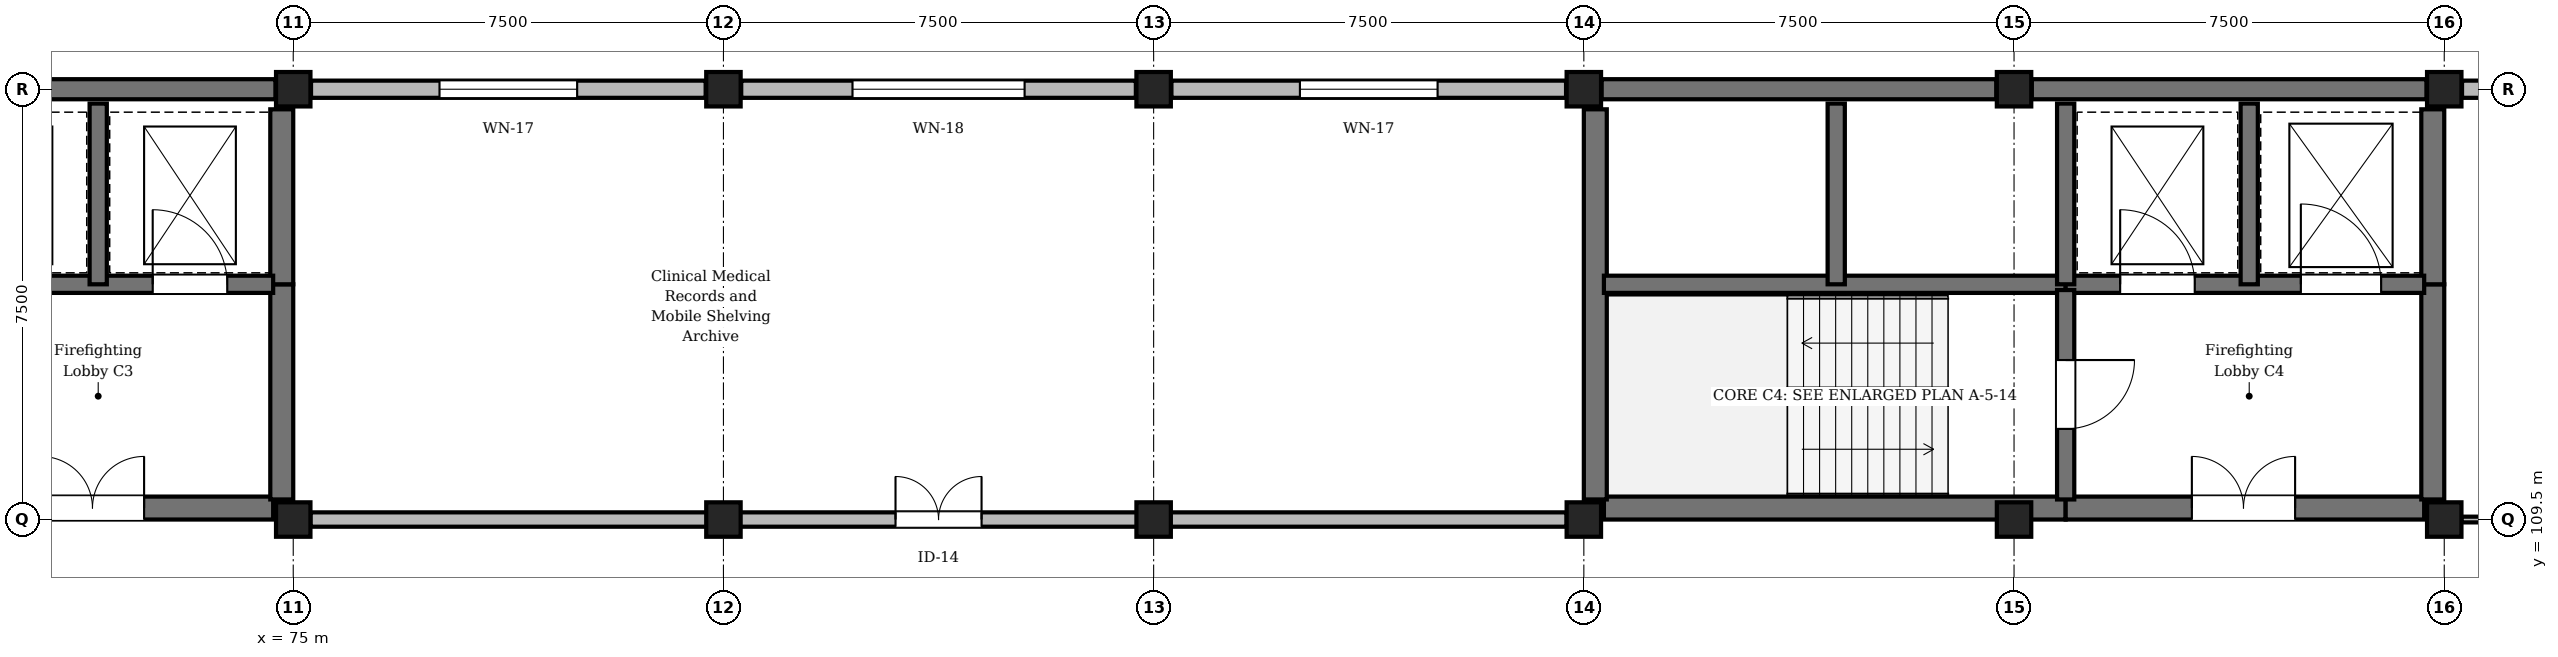
"""IFC4 building model, lengths in metres.
Left out: names, types, materials, properties, quantities, classifications, styles, units other than length and angle.
Written with IfcOpenShell. Run it as: python <this file> out.ifc"""

import sys

from ifc_helpers import new_model, si_unit, direction, frame, frame_2d, origin, origin_2d, place, context, subcontext, project, spatial, rectangle, circle, extrude, element, fill, save


model = new_model("IFC4")
c1 = context("Model", 3, precision=1e-05, world=origin(), true_north=direction((0.0, 1.0)))
c2 = subcontext(c1, "Body", "Model", "MODEL_VIEW")
j1 = project(units=[si_unit("LENGTHUNIT", "METRE"), si_unit("PLANEANGLEUNIT", "RADIAN")], contexts=[c1])
p1 = place(None, origin())
s1 = spatial("IfcSite", under=j1, at=p1, CompositionType="ELEMENT")
p2 = place(p1, origin())
s2 = spatial("IfcBuilding", under=s1, at=p2, CompositionType="ELEMENT")
p3 = place(p2, frame((0.0, 0.0, 14.1)))
s3 = spatial("IfcBuildingStorey", under=s2, at=p3, CompositionType="ELEMENT", Elevation=14.1)
p4 = place(p3, frame((75.0, 109.5, 0.0), z_axis=(0.0, 0.0, 1.0), x_axis=(1.0, 0.0, 0.0)))
e1 = element("IfcColumn", 1, at=p4, inside=s3, PredefinedType="COLUMN", context=c2, shape_type="SweptSolid", body=[
    extrude(circle(Radius=0.3, at=origin_2d()), origin(), (0.0, 0.0, 1.0), 3.75),
])
for number, where, z_axis, x_axis in (
    (2, (75.0, 117.0, 0.0), (0.0, 0.0, 1.0), (1.0, 0.0, 0.0)),
    (3, (82.5, 109.5, 0.0), (0.0, 0.0, 1.0), (1.0, 0.0, 0.0)),
    (4, (82.5, 117.0, 0.0), (0.0, 0.0, 1.0), (1.0, 0.0, 0.0)),
    (5, (90.0, 109.5, 0.0), (0.0, 0.0, 1.0), (1.0, 0.0, 0.0)),
):
    element("IfcColumn", number, at=place(p3, frame(where, z_axis=z_axis, x_axis=x_axis)), inside=s3, PredefinedType="COLUMN", context=c2, shape_type="SweptSolid", body=[
        extrude(rectangle(XDim=0.6, YDim=0.6, at=origin_2d()), origin(), (0.0, 0.0, 1.0), 3.75),
    ])
for number, where, z_axis, x_axis in (
    (6, (90.0, 117.0, 0.0), (0.0, 0.0, 1.0), (1.0, 0.0, 0.0)),
    (7, (97.5, 109.5, 0.0), (0.0, 0.0, 1.0), (1.0, 0.0, 0.0)),
):
    element("IfcColumn", number, at=place(p3, frame(where, z_axis=z_axis, x_axis=x_axis)), inside=s3, PredefinedType="COLUMN", context=c2, shape_type="SweptSolid", body=[
        extrude(circle(Radius=0.3, at=origin_2d()), origin(), (0.0, 0.0, 1.0), 3.75),
    ])
for number, where, z_axis, x_axis in (
    (8, (97.5, 117.0, 0.0), (0.0, 0.0, 1.0), (1.0, 0.0, 0.0)),
    (9, (105.0, 109.5, 0.0), (0.0, 0.0, 1.0), (1.0, 0.0, 0.0)),
    (10, (105.0, 117.0, 0.0), (0.0, 0.0, 1.0), (1.0, 0.0, 0.0)),
    (11, (112.5, 109.5, 0.0), (0.0, 0.0, 1.0), (1.0, 0.0, 0.0)),
):
    element("IfcColumn", number, at=place(p3, frame(where, z_axis=z_axis, x_axis=x_axis)), inside=s3, PredefinedType="COLUMN", context=c2, shape_type="SweptSolid", body=[
        extrude(rectangle(XDim=0.6, YDim=0.6, at=origin_2d()), origin(), (0.0, 0.0, 1.0), 3.75),
    ])
p5 = place(p3, frame((112.5, 117.0, 0.0), z_axis=(0.0, 0.0, 1.0), x_axis=(1.0, 0.0, 0.0)))
e12 = element("IfcColumn", 12, at=p5, inside=s3, PredefinedType="COLUMN", context=c2, shape_type="SweptSolid", body=[
    extrude(circle(Radius=0.3, at=origin_2d()), origin(), (0.0, 0.0, 1.0), 3.75),
])
p6 = place(p3, frame((67.81, 117.0, 0.0), z_axis=(0.0, 0.0, 1.0), x_axis=(1.0, 0.0, 0.0)))
e13 = element("IfcWall", 13, at=p6, inside=s3, PredefinedType="SHEAR", context=c2, shape_type="SweptSolid", body=[
    extrude(rectangle(XDim=6.88, YDim=0.35, at=frame_2d((3.44, 0.0))), origin(), (0.0, 0.0, 1.0), 3.47),
])
p7 = place(p3, frame((75.31, 117.0, 0.0), z_axis=(0.0, 0.0, 1.0), x_axis=(1.0, 0.0, 0.0)))
e14 = element("IfcWall", 14, at=p7, inside=s3, PredefinedType="STANDARD", context=c2, shape_type="SweptSolid", body=[
    extrude(rectangle(XDim=6.88, YDim=0.3, at=frame_2d((3.44, 0.0))), origin(), (0.0, 0.0, 1.0), 2.87),
])
p8 = place(p7, frame((2.24, 0.0, 1.1)))
e15 = element("IfcOpeningElement", 15, at=p8, cuts=e14, PredefinedType="OPENING", context=c2, shape_type="SweptSolid", body=[
    extrude(rectangle(XDim=2.4, YDim=1.2, at=frame_2d((1.2, 0.6))), frame((0.0, 0.16, 0.0), z_axis=(0.0, -1.0, 0.0), x_axis=(1.0, 0.0, 0.0)), (0.0, 0.0, 1.0), 0.32),
])
p9 = place(p3, frame((82.81, 117.0, 0.0), z_axis=(0.0, 0.0, 1.0), x_axis=(1.0, 0.0, 0.0)))
e16 = element("IfcWall", 16, at=p9, inside=s3, PredefinedType="STANDARD", context=c2, shape_type="SweptSolid", body=[
    extrude(rectangle(XDim=6.88, YDim=0.3, at=frame_2d((3.44, 0.0))), origin(), (0.0, 0.0, 1.0), 2.87),
])
p10 = place(p9, frame((1.94, 0.0, 1.1)))
e17 = element("IfcOpeningElement", 17, at=p10, cuts=e16, PredefinedType="OPENING", context=c2, shape_type="SweptSolid", body=[
    extrude(rectangle(XDim=3.0, YDim=1.2, at=frame_2d((1.5, 0.6))), frame((0.0, 0.16, 0.0), z_axis=(0.0, -1.0, 0.0), x_axis=(1.0, 0.0, 0.0)), (0.0, 0.0, 1.0), 0.32),
])
p11 = place(p3, frame((90.31, 117.0, 0.0), z_axis=(0.0, 0.0, 1.0), x_axis=(1.0, 0.0, 0.0)))
e18 = element("IfcWall", 18, at=p11, inside=s3, PredefinedType="STANDARD", context=c2, shape_type="SweptSolid", body=[
    extrude(rectangle(XDim=6.88, YDim=0.3, at=frame_2d((3.44, 0.0))), origin(), (0.0, 0.0, 1.0), 2.87),
])
p12 = place(p11, frame((2.24, 0.0, 1.1)))
e19 = element("IfcOpeningElement", 19, at=p12, cuts=e18, PredefinedType="OPENING", context=c2, shape_type="SweptSolid", body=[
    extrude(rectangle(XDim=2.4, YDim=1.2, at=frame_2d((1.2, 0.6))), frame((0.0, 0.16, 0.0), z_axis=(0.0, -1.0, 0.0), x_axis=(1.0, 0.0, 0.0)), (0.0, 0.0, 1.0), 0.32),
])
for number, where, z_axis, x_axis in (
    (20, (97.81, 117.0, 0.0), (0.0, 0.0, 1.0), (1.0, 0.0, 0.0)),
    (21, (105.31, 117.0, 0.0), (0.0, 0.0, 1.0), (1.0, 0.0, 0.0)),
):
    element("IfcWall", number, at=place(p3, frame(where, z_axis=z_axis, x_axis=x_axis)), inside=s3, PredefinedType="SHEAR", context=c2, shape_type="SweptSolid", body=[
        extrude(rectangle(XDim=6.88, YDim=0.35, at=frame_2d((3.44, 0.0))), origin(), (0.0, 0.0, 1.0), 3.47),
    ])
p13 = place(p3, frame((112.81, 117.0, 0.0), z_axis=(0.0, 0.0, 1.0), x_axis=(1.0, 0.0, 0.0)))
e22 = element("IfcWall", 22, at=p13, inside=s3, PredefinedType="STANDARD", context=c2, shape_type="SweptSolid", body=[
    extrude(rectangle(XDim=6.93, YDim=0.3, at=frame_2d((3.465, 0.0))), origin(), (0.0, 0.0, 1.0), 2.87),
])
p14 = place(p13, frame((1.965, 0.0, 1.1)))
e23 = element("IfcOpeningElement", 23, at=p14, cuts=e22, PredefinedType="OPENING", context=c2, shape_type="SweptSolid", body=[
    extrude(rectangle(XDim=3.0, YDim=1.2, at=frame_2d((1.5, 0.6))), frame((0.0, 0.16, 0.0), z_axis=(0.0, -1.0, 0.0), x_axis=(1.0, 0.0, 0.0)), (0.0, 0.0, 1.0), 0.32),
])
p15 = place(p3, frame((68.4, 109.7, 0.0), z_axis=(0.0, 0.0, 1.0), x_axis=(1.0, 0.0, 0.0)))
e24 = element("IfcWall", 24, at=p15, inside=s3, PredefinedType="SHEAR", context=c2, shape_type="SweptSolid", body=[
    extrude(rectangle(XDim=6.25, YDim=0.4, at=frame_2d((3.125, 0.0))), origin(), (0.0, 0.0, 1.0), 3.47),
])
p16 = place(p15, frame((2.2, 0.0, 0.0)))
e25 = element("IfcOpeningElement", 25, at=p16, cuts=e24, PredefinedType="OPENING", context=c2, shape_type="SweptSolid", body=[
    extrude(rectangle(XDim=1.8, YDim=2.25, at=frame_2d((0.9, 1.125))), frame((0.0, 0.21, 0.0), z_axis=(0.0, -1.0, 0.0), x_axis=(1.0, 0.0, 0.0)), (0.0, 0.0, 1.0), 0.42),
])
p17 = place(p3, frame((74.8, 109.85, 0.0), z_axis=(0.0, 0.0, 1.0), x_axis=(0.0, 1.0, 0.0)))
e26 = element("IfcWall", 26, at=p17, inside=s3, PredefinedType="SHEAR", context=c2, shape_type="SweptSolid", body=[
    extrude(rectangle(XDim=3.75, YDim=0.4, at=frame_2d((1.875, 0.0))), origin(), (0.0, 0.0, 1.0), 3.47),
])
p18 = place(p3, frame((74.8, 113.6, 0.0), z_axis=(0.0, 0.0, 1.0), x_axis=(0.0, 1.0, 0.0)))
e27 = element("IfcWall", 27, at=p18, inside=s3, PredefinedType="SHEAR", context=c2, shape_type="SweptSolid", body=[
    extrude(rectangle(XDim=3.05, YDim=0.4, at=frame_2d((1.525, 0.0))), origin(), (0.0, 0.0, 1.0), 3.47),
])
p19 = place(p3, frame((68.4, 113.6, 0.0), z_axis=(0.0, 0.0, 1.0), x_axis=(1.0, 0.0, 0.0)))
e28 = element("IfcWall", 28, at=p19, inside=s3, PredefinedType="SHEAR", context=c2, shape_type="SweptSolid", body=[
    extrude(rectangle(XDim=6.25, YDim=0.3, at=frame_2d((3.125, 0.0))), origin(), (0.0, 0.0, 1.0), 3.47),
])
p20 = place(p19, frame((0.95, 0.0, 0.0)))
e29 = element("IfcOpeningElement", 29, at=p20, cuts=e28, PredefinedType="OPENING", context=c2, shape_type="SweptSolid", body=[
    extrude(rectangle(XDim=1.3, YDim=2.2, at=frame_2d((0.65, 1.1))), frame((0.0, 0.16, 0.0), z_axis=(0.0, -1.0, 0.0), x_axis=(1.0, 0.0, 0.0)), (0.0, 0.0, 1.0), 0.32),
])
p21 = place(p19, frame((4.15, 0.0, 0.0)))
e30 = element("IfcOpeningElement", 30, at=p21, cuts=e28, PredefinedType="OPENING", context=c2, shape_type="SweptSolid", body=[
    extrude(rectangle(XDim=1.3, YDim=2.2, at=frame_2d((0.65, 1.1))), frame((0.0, 0.16, 0.0), z_axis=(0.0, -1.0, 0.0), x_axis=(1.0, 0.0, 0.0)), (0.0, 0.0, 1.0), 0.32),
])
p22 = place(p3, frame((71.6, 113.6, 0.0), z_axis=(0.0, 0.0, 1.0), x_axis=(0.0, 1.0, 0.0)))
e31 = element("IfcWall", 31, at=p22, inside=s3, PredefinedType="SHEAR", context=c2, shape_type="SweptSolid", body=[
    extrude(rectangle(XDim=3.15, YDim=0.3, at=frame_2d((1.575, 0.0))), origin(), (0.0, 0.0, 1.0), 3.47),
])
p23 = place(p3, frame((97.85, 109.7, 0.0), z_axis=(0.0, 0.0, 1.0), x_axis=(1.0, 0.0, 0.0)))
e32 = element("IfcWall", 32, at=p23, inside=s3, PredefinedType="SHEAR", context=c2, shape_type="SweptSolid", body=[
    extrude(rectangle(XDim=8.05, YDim=0.4, at=frame_2d((4.025, 0.0))), origin(), (0.0, 0.0, 1.0), 3.47),
])
p24 = place(p3, frame((105.9, 109.7, 0.0), z_axis=(0.0, 0.0, 1.0), x_axis=(1.0, 0.0, 0.0)))
e33 = element("IfcWall", 33, at=p24, inside=s3, PredefinedType="SHEAR", context=c2, shape_type="SweptSolid", body=[
    extrude(rectangle(XDim=6.25, YDim=0.4, at=frame_2d((3.125, 0.0))), origin(), (0.0, 0.0, 1.0), 3.47),
])
p25 = place(p24, frame((2.2, 0.0, 0.0)))
e34 = element("IfcOpeningElement", 34, at=p25, cuts=e33, PredefinedType="OPENING", context=c2, shape_type="SweptSolid", body=[
    extrude(rectangle(XDim=1.8, YDim=2.25, at=frame_2d((0.9, 1.125))), frame((0.0, 0.21, 0.0), z_axis=(0.0, -1.0, 0.0), x_axis=(1.0, 0.0, 0.0)), (0.0, 0.0, 1.0), 0.42),
])
p26 = place(p3, frame((97.7, 109.85, 0.0), z_axis=(0.0, 0.0, 1.0), x_axis=(0.0, 1.0, 0.0)))
e35 = element("IfcWall", 35, at=p26, inside=s3, PredefinedType="SHEAR", context=c2, shape_type="SweptSolid", body=[
    extrude(rectangle(XDim=6.8, YDim=0.4, at=frame_2d((3.4, 0.0))), origin(), (0.0, 0.0, 1.0), 3.47),
])
p27 = place(p3, frame((112.3, 109.85, 0.0), z_axis=(0.0, 0.0, 1.0), x_axis=(0.0, 1.0, 0.0)))
e36 = element("IfcWall", 36, at=p27, inside=s3, PredefinedType="SHEAR", context=c2, shape_type="SweptSolid", body=[
    extrude(rectangle(XDim=3.75, YDim=0.4, at=frame_2d((1.875, 0.0))), origin(), (0.0, 0.0, 1.0), 3.47),
])
p28 = place(p3, frame((112.3, 113.6, 0.0), z_axis=(0.0, 0.0, 1.0), x_axis=(0.0, 1.0, 0.0)))
e37 = element("IfcWall", 37, at=p28, inside=s3, PredefinedType="SHEAR", context=c2, shape_type="SweptSolid", body=[
    extrude(rectangle(XDim=3.05, YDim=0.4, at=frame_2d((1.525, 0.0))), origin(), (0.0, 0.0, 1.0), 3.47),
])
p29 = place(p3, frame((97.85, 113.6, 0.0), z_axis=(0.0, 0.0, 1.0), x_axis=(1.0, 0.0, 0.0)))
e38 = element("IfcWall", 38, at=p29, inside=s3, PredefinedType="SHEAR", context=c2, shape_type="SweptSolid", body=[
    extrude(rectangle(XDim=8.05, YDim=0.3, at=frame_2d((4.025, 0.0))), origin(), (0.0, 0.0, 1.0), 3.47),
])
p30 = place(p3, frame((105.9, 113.6, 0.0), z_axis=(0.0, 0.0, 1.0), x_axis=(1.0, 0.0, 0.0)))
e39 = element("IfcWall", 39, at=p30, inside=s3, PredefinedType="SHEAR", context=c2, shape_type="SweptSolid", body=[
    extrude(rectangle(XDim=6.25, YDim=0.3, at=frame_2d((3.125, 0.0))), origin(), (0.0, 0.0, 1.0), 3.47),
])
p31 = place(p30, frame((0.95, 0.0, 0.0)))
e40 = element("IfcOpeningElement", 40, at=p31, cuts=e39, PredefinedType="OPENING", context=c2, shape_type="SweptSolid", body=[
    extrude(rectangle(XDim=1.3, YDim=2.2, at=frame_2d((0.65, 1.1))), frame((0.0, 0.16, 0.0), z_axis=(0.0, -1.0, 0.0), x_axis=(1.0, 0.0, 0.0)), (0.0, 0.0, 1.0), 0.32),
])
p32 = place(p30, frame((4.1, 0.0, 0.0)))
e41 = element("IfcOpeningElement", 41, at=p32, cuts=e39, PredefinedType="OPENING", context=c2, shape_type="SweptSolid", body=[
    extrude(rectangle(XDim=1.4, YDim=2.25, at=frame_2d((0.7, 1.125))), frame((0.0, 0.16, 0.0), z_axis=(0.0, -1.0, 0.0), x_axis=(1.0, 0.0, 0.0)), (0.0, 0.0, 1.0), 0.32),
])
p33 = place(p3, frame((105.9, 113.5, 0.0), z_axis=(0.0, 0.0, 1.0), x_axis=(0.0, -1.0, 0.0)))
e42 = element("IfcWall", 42, at=p33, inside=s3, PredefinedType="SHEAR", context=c2, shape_type="SweptSolid", body=[
    extrude(rectangle(XDim=3.65, YDim=0.3, at=frame_2d((1.825, 0.0))), origin(), (0.0, 0.0, 1.0), 3.47),
])
p34 = place(p33, frame((1.22, 0.0, 0.0)))
e43 = element("IfcOpeningElement", 43, at=p34, cuts=e42, PredefinedType="OPENING", context=c2, shape_type="SweptSolid", body=[
    extrude(rectangle(XDim=1.2, YDim=2.25, at=frame_2d((0.6, 1.125))), frame((0.0, 0.16, 0.0), z_axis=(0.0, -1.0, 0.0), x_axis=(1.0, 0.0, 0.0)), (0.0, 0.0, 1.0), 0.32),
])
for number, where, z_axis, x_axis in (
    (44, (101.9, 113.6, 0.0), (0.0, 0.0, 1.0), (0.0, 1.0, 0.0)),
    (45, (105.9, 113.6, 0.0), (0.0, 0.0, 1.0), (0.0, 1.0, 0.0)),
    (46, (109.1, 113.6, 0.0), (0.0, 0.0, 1.0), (0.0, 1.0, 0.0)),
):
    element("IfcWall", number, at=place(p3, frame(where, z_axis=z_axis, x_axis=x_axis)), inside=s3, PredefinedType="SHEAR", context=c2, shape_type="SweptSolid", body=[
        extrude(rectangle(XDim=3.15, YDim=0.3, at=frame_2d((1.575, 0.0))), origin(), (0.0, 0.0, 1.0), 3.47),
    ])
p35 = place(p3, frame((75.3, 109.5, 0.0), z_axis=(0.0, 0.0, 1.0), x_axis=(1.0, 0.0, 0.0)))
e47 = element("IfcWall", 47, at=p35, inside=s3, PredefinedType="STANDARD", context=c2, shape_type="SweptSolid", body=[
    extrude(rectangle(XDim=21.9, YDim=0.25, at=frame_2d((10.95, 0.0))), origin(), (0.0, 0.0, 1.0), 2.855),
])
p36 = place(p35, frame((10.2, 0.0, 0.0)))
e48 = element("IfcOpeningElement", 48, at=p36, cuts=e47, PredefinedType="OPENING", context=c2, shape_type="SweptSolid", body=[
    extrude(rectangle(XDim=1.5, YDim=2.3, at=frame_2d((0.75, 1.15))), frame((0.0, 0.135, 0.0), z_axis=(0.0, -1.0, 0.0), x_axis=(1.0, 0.0, 0.0)), (0.0, 0.0, 1.0), 0.27),
])
p37 = place(p3, frame((112.8, 109.5, 0.0), z_axis=(0.0, 0.0, 1.0), x_axis=(1.0, 0.0, 0.0)))
e49 = element("IfcWall", 49, at=p37, inside=s3, PredefinedType="PARTITIONING", context=c2, shape_type="SweptSolid", body=[
    extrude(rectangle(XDim=14.35, YDim=0.1, at=frame_2d((7.175, 0.0))), origin(), (0.0, 0.0, 1.0), 2.855),
])
p38 = place(p37, frame((10.49, 0.0, 0.0)))
e50 = element("IfcOpeningElement", 50, at=p38, cuts=e49, PredefinedType="OPENING", context=c2, shape_type="SweptSolid", body=[
    extrude(rectangle(XDim=1.05, YDim=2.2, at=frame_2d((0.525, 1.1))), frame((0.0, 0.06, 0.0), z_axis=(0.0, -1.0, 0.0), x_axis=(1.0, 0.0, 0.0)), (0.0, 0.0, 1.0), 0.12),
])
p39 = place(p8, origin())
e51 = element("IfcWindow", 51, at=p39, inside=s3, PartitioningType="SINGLE_PANEL", PredefinedType="WINDOW", context=c2, shape_type="SweptSolid", body=[
    extrude(rectangle(XDim=2.4, YDim=1.2, at=frame_2d((1.2, 0.6))), frame((0.0, 0.03, 0.0), z_axis=(0.0, -1.0, 0.0), x_axis=(1.0, 0.0, 0.0)), (0.0, 0.0, 1.0), 0.06),
])
fill(e15, e51)
p40 = place(p10, origin())
e52 = element("IfcWindow", 52, at=p40, inside=s3, PartitioningType="SINGLE_PANEL", PredefinedType="WINDOW", context=c2, shape_type="SweptSolid", body=[
    extrude(rectangle(XDim=3.0, YDim=1.2, at=frame_2d((1.5, 0.6))), frame((0.0, 0.03, 0.0), z_axis=(0.0, -1.0, 0.0), x_axis=(1.0, 0.0, 0.0)), (0.0, 0.0, 1.0), 0.06),
])
fill(e17, e52)
p41 = place(p12, origin())
e53 = element("IfcWindow", 53, at=p41, inside=s3, PartitioningType="SINGLE_PANEL", PredefinedType="WINDOW", context=c2, shape_type="SweptSolid", body=[
    extrude(rectangle(XDim=2.4, YDim=1.2, at=frame_2d((1.2, 0.6))), frame((0.0, 0.03, 0.0), z_axis=(0.0, -1.0, 0.0), x_axis=(1.0, 0.0, 0.0)), (0.0, 0.0, 1.0), 0.06),
])
fill(e19, e53)
p42 = place(p16, origin())
e54 = element("IfcDoor", 54, at=p42, inside=s3, OperationType="DOUBLE_DOOR_SINGLE_SWING", PredefinedType="DOOR", context=c2, shape_type="SweptSolid", body=[
    extrude(rectangle(XDim=1.8, YDim=2.25, at=frame_2d((0.9, 1.125))), frame((0.0, 0.025, 0.0), z_axis=(0.0, -1.0, 0.0), x_axis=(1.0, 0.0, 0.0)), (0.0, 0.0, 1.0), 0.05),
])
fill(e25, e54)
p43 = place(p21, origin())
e55 = element("IfcDoor", 55, at=p43, inside=s3, OperationType="DOUBLE_DOOR_SLIDING", PredefinedType="DOOR", context=c2, shape_type="SweptSolid", body=[
    extrude(rectangle(XDim=1.3, YDim=2.2, at=frame_2d((0.65, 1.1))), frame((0.0, 0.025, 0.0), z_axis=(0.0, -1.0, 0.0), x_axis=(1.0, 0.0, 0.0)), (0.0, 0.0, 1.0), 0.05),
])
fill(e30, e55)
p44 = place(p25, origin())
e56 = element("IfcDoor", 56, at=p44, inside=s3, OperationType="DOUBLE_DOOR_SINGLE_SWING", PredefinedType="DOOR", context=c2, shape_type="SweptSolid", body=[
    extrude(rectangle(XDim=1.8, YDim=2.25, at=frame_2d((0.9, 1.125))), frame((0.0, 0.025, 0.0), z_axis=(0.0, -1.0, 0.0), x_axis=(1.0, 0.0, 0.0)), (0.0, 0.0, 1.0), 0.05),
])
fill(e34, e56)
p45 = place(p31, origin())
e57 = element("IfcDoor", 57, at=p45, inside=s3, OperationType="DOUBLE_DOOR_SLIDING", PredefinedType="DOOR", context=c2, shape_type="SweptSolid", body=[
    extrude(rectangle(XDim=1.3, YDim=2.2, at=frame_2d((0.65, 1.1))), frame((0.0, 0.025, 0.0), z_axis=(0.0, -1.0, 0.0), x_axis=(1.0, 0.0, 0.0)), (0.0, 0.0, 1.0), 0.05),
])
fill(e40, e57)
p46 = place(p32, origin())
e58 = element("IfcDoor", 58, at=p46, inside=s3, OperationType="DOUBLE_DOOR_SLIDING", PredefinedType="DOOR", context=c2, shape_type="SweptSolid", body=[
    extrude(rectangle(XDim=1.4, YDim=2.25, at=frame_2d((0.7, 1.125))), frame((0.0, 0.025, 0.0), z_axis=(0.0, -1.0, 0.0), x_axis=(1.0, 0.0, 0.0)), (0.0, 0.0, 1.0), 0.05),
])
fill(e41, e58)
p47 = place(p34, origin())
e59 = element("IfcDoor", 59, at=p47, inside=s3, OperationType="SINGLE_SWING_LEFT", PredefinedType="DOOR", context=c2, shape_type="SweptSolid", body=[
    extrude(rectangle(XDim=1.2, YDim=2.25, at=frame_2d((0.6, 1.125))), frame((0.0, 0.025, 0.0), z_axis=(0.0, -1.0, 0.0), x_axis=(1.0, 0.0, 0.0)), (0.0, 0.0, 1.0), 0.05),
])
fill(e43, e59)
p48 = place(p36, origin())
e60 = element("IfcDoor", 60, at=p48, inside=s3, OperationType="DOUBLE_DOOR_SINGLE_SWING", PredefinedType="DOOR", context=c2, shape_type="SweptSolid", body=[
    extrude(rectangle(XDim=1.5, YDim=2.3, at=frame_2d((0.75, 1.15))), frame((0.0, 0.025, 0.0), z_axis=(0.0, -1.0, 0.0), x_axis=(1.0, 0.0, 0.0)), (0.0, 0.0, 1.0), 0.05),
])
fill(e48, e60)
save(model, sys.argv[1])
